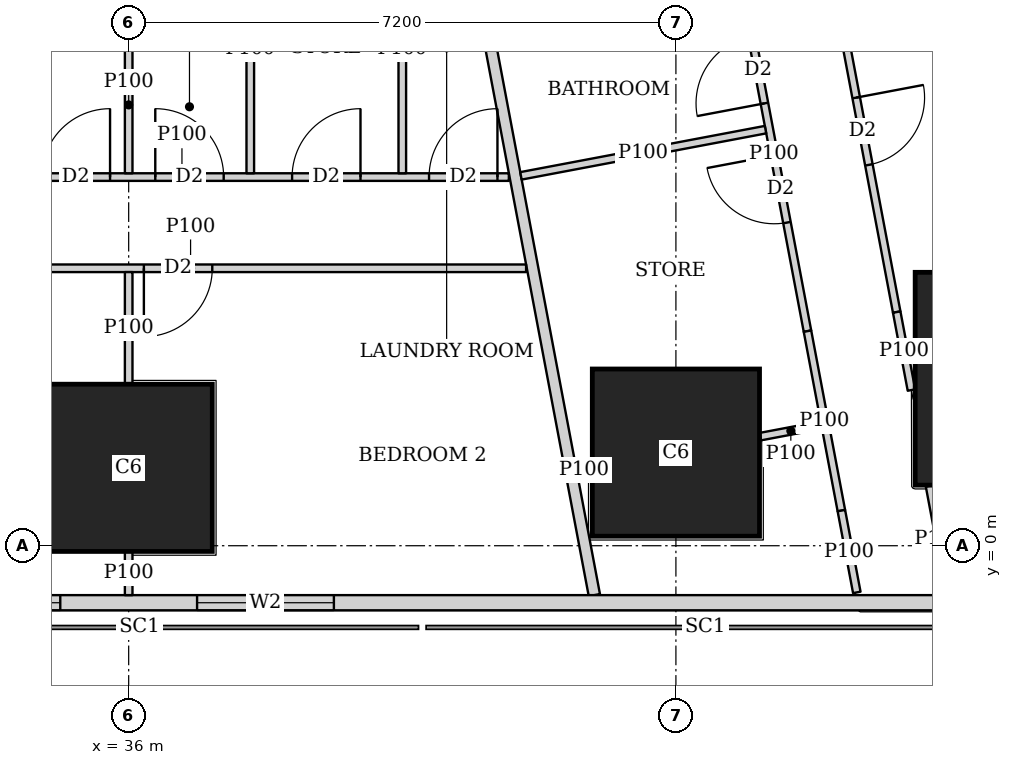
"""IFC4 building model, lengths in metres.
Left out: names, types, materials, properties, quantities, classifications, styles, units other than length and angle.
Written with IfcOpenShell. Run it as: python <this file> out.ifc"""

import sys

from ifc_helpers import new_model, si_unit, direction, frame, frame_2d, origin, origin_2d, place, context, subcontext, project, spatial, rectangle, extrude, element, fill, save


model = new_model("IFC4")
c1 = context("Model", 3, precision=1e-05, world=origin(), true_north=direction((0.0, 1.0)))
c2 = subcontext(c1, "Body", "Model", "MODEL_VIEW")
j1 = project(units=[si_unit("LENGTHUNIT", "METRE"), si_unit("PLANEANGLEUNIT", "RADIAN")], contexts=[c1])
p1 = place(None, origin())
s1 = spatial("IfcSite", under=j1, at=p1, CompositionType="ELEMENT")
p2 = place(p1, origin())
s2 = spatial("IfcBuilding", under=s1, at=p2, CompositionType="ELEMENT")
p3 = place(p2, frame((0.0, 0.0, 77.9)))
s3 = spatial("IfcBuildingStorey", under=s2, at=p3, CompositionType="ELEMENT", Elevation=77.9)
for number, where, z_axis, x_axis in (
    (1, (36.0, 1.025, 0.0), (0.0, 0.0, 1.0), (1.0, 0.0, 0.0)),
    (2, (43.2, 1.225, 0.0), (0.0, 0.0, 1.0), (1.0, 0.0, 0.0)),
):
    element("IfcColumn", number, at=place(p3, frame(where, z_axis=z_axis, x_axis=x_axis)), inside=s3, PredefinedType="COLUMN", context=c2, shape_type="SweptSolid", body=[
        extrude(rectangle(XDim=2.2, YDim=2.2, at=origin_2d()), origin(), (0.0, 0.0, 1.0), 3.75),
    ])
p4 = place(p3, frame((47.748, 2.197, 0.0), z_axis=(0.0, 0.0, 1.0), x_axis=(1.0, 0.0, 0.0)))
e3 = element("IfcColumn", 3, at=p4, inside=s3, PredefinedType="COLUMN", context=c2, shape_type="SweptSolid", body=[
    extrude(rectangle(XDim=2.8, YDim=2.8, at=origin_2d()), origin(), (0.0, 0.0, 1.0), 3.75),
])
p5 = place(p3, frame((2.163, -0.75, 0.0), z_axis=(0.0, 0.0, 1.0), x_axis=(1.0, 0.0, 0.0)))
e4 = element("IfcWall", 4, at=p5, inside=s3, PredefinedType="SOLIDWALL", context=c2, shape_type="SweptSolid", body=[
    extrude(rectangle(XDim=45.628, YDim=0.2, at=frame_2d((22.814, 0.0))), origin(), (0.0, 0.0, 1.0), 3.5),
])
p6 = place(p5, frame((9.537, 0.0, 0.9)))
e5 = element("IfcOpeningElement", 5, at=p6, cuts=e4, PredefinedType="OPENING", context=c2, shape_type="SweptSolid", body=[
    extrude(rectangle(XDim=1.8, YDim=1.5, at=frame_2d((0.9, 0.75))), frame((0.0, 0.11, 0.0), z_axis=(0.0, -1.0, 0.0), x_axis=(1.0, 0.0, 0.0)), (0.0, 0.0, 1.0), 0.22),
])
p7 = place(p5, frame((13.137, 0.0, 0.9)))
e6 = element("IfcOpeningElement", 6, at=p7, cuts=e4, PredefinedType="OPENING", context=c2, shape_type="SweptSolid", body=[
    extrude(rectangle(XDim=1.8, YDim=1.5, at=frame_2d((0.9, 0.75))), frame((0.0, 0.11, 0.0), z_axis=(0.0, -1.0, 0.0), x_axis=(1.0, 0.0, 0.0)), (0.0, 0.0, 1.0), 0.22),
])
p8 = place(p5, frame((16.737, 0.0, 0.9)))
e7 = element("IfcOpeningElement", 7, at=p8, cuts=e4, PredefinedType="OPENING", context=c2, shape_type="SweptSolid", body=[
    extrude(rectangle(XDim=1.8, YDim=1.5, at=frame_2d((0.9, 0.75))), frame((0.0, 0.11, 0.0), z_axis=(0.0, -1.0, 0.0), x_axis=(1.0, 0.0, 0.0)), (0.0, 0.0, 1.0), 0.22),
])
p9 = place(p5, frame((20.337, 0.0, 0.9)))
e8 = element("IfcOpeningElement", 8, at=p9, cuts=e4, PredefinedType="OPENING", context=c2, shape_type="SweptSolid", body=[
    extrude(rectangle(XDim=1.8, YDim=1.5, at=frame_2d((0.9, 0.75))), frame((0.0, 0.11, 0.0), z_axis=(0.0, -1.0, 0.0), x_axis=(1.0, 0.0, 0.0)), (0.0, 0.0, 1.0), 0.22),
])
p10 = place(p5, frame((23.937, 0.0, 0.9)))
e9 = element("IfcOpeningElement", 9, at=p10, cuts=e4, PredefinedType="OPENING", context=c2, shape_type="SweptSolid", body=[
    extrude(rectangle(XDim=1.8, YDim=1.5, at=frame_2d((0.9, 0.75))), frame((0.0, 0.11, 0.0), z_axis=(0.0, -1.0, 0.0), x_axis=(1.0, 0.0, 0.0)), (0.0, 0.0, 1.0), 0.22),
])
p11 = place(p5, frame((27.537, 0.0, 0.9)))
e10 = element("IfcOpeningElement", 10, at=p11, cuts=e4, PredefinedType="OPENING", context=c2, shape_type="SweptSolid", body=[
    extrude(rectangle(XDim=1.8, YDim=1.5, at=frame_2d((0.9, 0.75))), frame((0.0, 0.11, 0.0), z_axis=(0.0, -1.0, 0.0), x_axis=(1.0, 0.0, 0.0)), (0.0, 0.0, 1.0), 0.22),
])
p12 = place(p5, frame((31.137, 0.0, 0.9)))
e11 = element("IfcOpeningElement", 11, at=p12, cuts=e4, PredefinedType="OPENING", context=c2, shape_type="SweptSolid", body=[
    extrude(rectangle(XDim=1.8, YDim=1.5, at=frame_2d((0.9, 0.75))), frame((0.0, 0.11, 0.0), z_axis=(0.0, -1.0, 0.0), x_axis=(1.0, 0.0, 0.0)), (0.0, 0.0, 1.0), 0.22),
])
p13 = place(p5, frame((34.737, 0.0, 0.9)))
e12 = element("IfcOpeningElement", 12, at=p13, cuts=e4, PredefinedType="OPENING", context=c2, shape_type="SweptSolid", body=[
    extrude(rectangle(XDim=1.8, YDim=1.5, at=frame_2d((0.9, 0.75))), frame((0.0, 0.11, 0.0), z_axis=(0.0, -1.0, 0.0), x_axis=(1.0, 0.0, 0.0)), (0.0, 0.0, 1.0), 0.22),
])
p14 = place(p3, frame((50.653, 2.703, 0.0), z_axis=(0.0, 0.0, 1.0), x_axis=(-0.185612026696, 0.982623109613, 0.0)))
e13 = element("IfcWall", 13, at=p14, inside=s3, PredefinedType="SOLIDWALL", context=c2, shape_type="SweptSolid", body=[
    extrude(rectangle(XDim=41.393, YDim=0.2, at=frame_2d((20.697, 0.0))), origin(), (0.0, 0.0, 1.0), 3.5),
])
p15 = place(p14, frame((1.633, 0.0, 0.9)))
e14 = element("IfcOpeningElement", 14, at=p15, cuts=e13, PredefinedType="OPENING", context=c2, shape_type="SweptSolid", body=[
    extrude(rectangle(XDim=1.8, YDim=1.5, at=frame_2d((0.9, 0.75))), frame((0.0, 0.11, 0.0), z_axis=(0.0, -1.0, 0.0), x_axis=(1.0, 0.0, 0.0)), (0.0, 0.0, 1.0), 0.22),
])
p16 = place(p14, frame((6.032, 0.0, 0.9)))
e15 = element("IfcOpeningElement", 15, at=p16, cuts=e13, PredefinedType="OPENING", context=c2, shape_type="SweptSolid", body=[
    extrude(rectangle(XDim=1.8, YDim=1.5, at=frame_2d((0.9, 0.75))), frame((0.0, 0.11, 0.0), z_axis=(0.0, -1.0, 0.0), x_axis=(1.0, 0.0, 0.0)), (0.0, 0.0, 1.0), 0.22),
])
p17 = place(p14, frame((9.848, 0.0, 0.9)))
e16 = element("IfcOpeningElement", 16, at=p17, cuts=e13, PredefinedType="OPENING", context=c2, shape_type="SweptSolid", body=[
    extrude(rectangle(XDim=1.8, YDim=1.5, at=frame_2d((0.9, 0.75))), frame((0.0, 0.11, 0.0), z_axis=(0.0, -1.0, 0.0), x_axis=(1.0, 0.0, 0.0)), (0.0, 0.0, 1.0), 0.22),
])
p18 = place(p14, frame((13.664, 0.0, 0.9)))
e17 = element("IfcOpeningElement", 17, at=p18, cuts=e13, PredefinedType="OPENING", context=c2, shape_type="SweptSolid", body=[
    extrude(rectangle(XDim=1.8, YDim=1.5, at=frame_2d((0.9, 0.75))), frame((0.0, 0.11, 0.0), z_axis=(0.0, -1.0, 0.0), x_axis=(1.0, 0.0, 0.0)), (0.0, 0.0, 1.0), 0.22),
])
p19 = place(p14, frame((17.481, 0.0, 0.9)))
e18 = element("IfcOpeningElement", 18, at=p19, cuts=e13, PredefinedType="OPENING", context=c2, shape_type="SweptSolid", body=[
    extrude(rectangle(XDim=1.8, YDim=1.5, at=frame_2d((0.9, 0.75))), frame((0.0, 0.11, 0.0), z_axis=(0.0, -1.0, 0.0), x_axis=(1.0, 0.0, 0.0)), (0.0, 0.0, 1.0), 0.22),
])
p20 = place(p14, frame((21.297, 0.0, 0.9)))
e19 = element("IfcOpeningElement", 19, at=p20, cuts=e13, PredefinedType="OPENING", context=c2, shape_type="SweptSolid", body=[
    extrude(rectangle(XDim=1.8, YDim=1.5, at=frame_2d((0.9, 0.75))), frame((0.0, 0.11, 0.0), z_axis=(0.0, -1.0, 0.0), x_axis=(1.0, 0.0, 0.0)), (0.0, 0.0, 1.0), 0.22),
])
p21 = place(p14, frame((25.113, 0.0, 0.9)))
e20 = element("IfcOpeningElement", 20, at=p21, cuts=e13, PredefinedType="OPENING", context=c2, shape_type="SweptSolid", body=[
    extrude(rectangle(XDim=1.8, YDim=1.5, at=frame_2d((0.9, 0.75))), frame((0.0, 0.11, 0.0), z_axis=(0.0, -1.0, 0.0), x_axis=(1.0, 0.0, 0.0)), (0.0, 0.0, 1.0), 0.22),
])
p22 = place(p14, frame((28.93, 0.0, 0.9)))
e21 = element("IfcOpeningElement", 21, at=p22, cuts=e13, PredefinedType="OPENING", context=c2, shape_type="SweptSolid", body=[
    extrude(rectangle(XDim=1.8, YDim=1.5, at=frame_2d((0.9, 0.75))), frame((0.0, 0.11, 0.0), z_axis=(0.0, -1.0, 0.0), x_axis=(1.0, 0.0, 0.0)), (0.0, 0.0, 1.0), 0.22),
])
p23 = place(p14, frame((32.746, 0.0, 0.9)))
e22 = element("IfcOpeningElement", 22, at=p23, cuts=e13, PredefinedType="OPENING", context=c2, shape_type="SweptSolid", body=[
    extrude(rectangle(XDim=1.8, YDim=1.5, at=frame_2d((0.9, 0.75))), frame((0.0, 0.11, 0.0), z_axis=(0.0, -1.0, 0.0), x_axis=(1.0, 0.0, 0.0)), (0.0, 0.0, 1.0), 0.22),
])
p24 = place(p14, frame((36.481, 0.0, 0.9)))
e23 = element("IfcOpeningElement", 23, at=p24, cuts=e13, PredefinedType="OPENING", context=c2, shape_type="SweptSolid", body=[
    extrude(rectangle(XDim=1.8, YDim=1.5, at=frame_2d((0.9, 0.75))), frame((0.0, 0.11, 0.0), z_axis=(0.0, -1.0, 0.0), x_axis=(1.0, 0.0, 0.0)), (0.0, 0.0, 1.0), 0.22),
])
p25 = place(p3, frame((33.382, 45.65, 0.0), z_axis=(0.0, 0.0, 1.0), x_axis=(0.185593544777, -0.982626600565, 0.0)))
e24 = element("IfcWall", 24, at=p25, inside=s3, PredefinedType="SOLIDWALL", context=c2, shape_type="SweptSolid", body=[
    extrude(rectangle(XDim=47.118, YDim=0.15, at=frame_2d((23.559, 0.0))), origin(), (0.0, 0.0, 1.0), 2.2),
])
p26 = place(p25, frame((19.054, 0.0, 0.0)))
e25 = element("IfcOpeningElement", 25, at=p26, cuts=e24, PredefinedType="OPENING", context=c2, shape_type="SweptSolid", body=[
    extrude(rectangle(XDim=1.0, YDim=2.1, at=frame_2d((0.5, 1.05))), frame((0.0, 0.085, 0.0), z_axis=(0.0, -1.0, 0.0), x_axis=(1.0, 0.0, 0.0)), (0.0, 0.0, 1.0), 0.17),
])
p27 = place(p25, frame((22.87, 0.0, 0.0)))
e26 = element("IfcOpeningElement", 26, at=p27, cuts=e24, PredefinedType="OPENING", context=c2, shape_type="SweptSolid", body=[
    extrude(rectangle(XDim=1.0, YDim=2.1, at=frame_2d((0.5, 1.05))), frame((0.0, 0.085, 0.0), z_axis=(0.0, -1.0, 0.0), x_axis=(1.0, 0.0, 0.0)), (0.0, 0.0, 1.0), 0.17),
])
p28 = place(p25, frame((33.833, 0.0, 0.0)))
e27 = element("IfcOpeningElement", 27, at=p28, cuts=e24, PredefinedType="OPENING", context=c2, shape_type="SweptSolid", body=[
    extrude(rectangle(XDim=1.0, YDim=2.1, at=frame_2d((0.5, 1.05))), frame((0.0, 0.085, 0.0), z_axis=(0.0, -1.0, 0.0), x_axis=(1.0, 0.0, 0.0)), (0.0, 0.0, 1.0), 0.17),
])
p29 = place(p3, frame((41.229, 3.65, 0.0), z_axis=(0.0, 0.0, 1.0), x_axis=(-1.0, 0.0, 0.0)))
e28 = element("IfcWall", 28, at=p29, inside=s3, PredefinedType="PARTITIONING", context=c2, shape_type="SweptSolid", body=[
    extrude(rectangle(XDim=8.829, YDim=0.1, at=frame_2d((4.415, 0.0))), origin(), (0.0, 0.0, 1.0), 3.5),
])
p30 = place(p29, frame((7.729, 0.0, 0.0)))
e29 = element("IfcOpeningElement", 29, at=p30, cuts=e28, PredefinedType="OPENING", context=c2, shape_type="SweptSolid", body=[
    extrude(rectangle(XDim=0.9, YDim=2.1, at=frame_2d((0.45, 1.05))), frame((0.0, 0.06, 0.0), z_axis=(0.0, -1.0, 0.0), x_axis=(1.0, 0.0, 0.0)), (0.0, 0.0, 1.0), 0.12),
])
p31 = place(p29, frame((4.129, 0.0, 0.0)))
e30 = element("IfcOpeningElement", 30, at=p31, cuts=e28, PredefinedType="OPENING", context=c2, shape_type="SweptSolid", body=[
    extrude(rectangle(XDim=0.9, YDim=2.1, at=frame_2d((0.45, 1.05))), frame((0.0, 0.06, 0.0), z_axis=(0.0, -1.0, 0.0), x_axis=(1.0, 0.0, 0.0)), (0.0, 0.0, 1.0), 0.12),
])
p32 = place(p3, frame((41.002, 4.85, 0.0), z_axis=(0.0, 0.0, 1.0), x_axis=(-1.0, 0.0, 0.0)))
e31 = element("IfcWall", 31, at=p32, inside=s3, PredefinedType="PARTITIONING", context=c2, shape_type="SweptSolid", body=[
    extrude(rectangle(XDim=8.602, YDim=0.1, at=frame_2d((4.301, 0.0))), origin(), (0.0, 0.0, 1.0), 3.5),
])
p33 = place(p32, frame((7.047, 0.0, 0.0)))
e32 = element("IfcOpeningElement", 32, at=p33, cuts=e31, PredefinedType="OPENING", context=c2, shape_type="SweptSolid", body=[
    extrude(rectangle(XDim=0.9, YDim=2.1, at=frame_2d((0.45, 1.05))), frame((0.0, 0.06, 0.0), z_axis=(0.0, -1.0, 0.0), x_axis=(1.0, 0.0, 0.0)), (0.0, 0.0, 1.0), 0.12),
])
p34 = place(p32, frame((3.752, 0.0, 0.0)))
e33 = element("IfcOpeningElement", 33, at=p34, cuts=e31, PredefinedType="OPENING", context=c2, shape_type="SweptSolid", body=[
    extrude(rectangle(XDim=0.9, YDim=2.1, at=frame_2d((0.45, 1.05))), frame((0.0, 0.06, 0.0), z_axis=(0.0, -1.0, 0.0), x_axis=(1.0, 0.0, 0.0)), (0.0, 0.0, 1.0), 0.12),
])
p35 = place(p32, frame((0.15, 0.0, 0.0)))
e34 = element("IfcOpeningElement", 34, at=p35, cuts=e31, PredefinedType="OPENING", context=c2, shape_type="SweptSolid", body=[
    extrude(rectangle(XDim=0.9, YDim=2.1, at=frame_2d((0.45, 1.05))), frame((0.0, 0.06, 0.0), z_axis=(0.0, -1.0, 0.0), x_axis=(1.0, 0.0, 0.0)), (0.0, 0.0, 1.0), 0.12),
])
p36 = place(p32, frame((5.247, 0.0, 0.0)))
e35 = element("IfcOpeningElement", 35, at=p36, cuts=e31, PredefinedType="OPENING", context=c2, shape_type="SweptSolid", body=[
    extrude(rectangle(XDim=0.9, YDim=2.1, at=frame_2d((0.45, 1.05))), frame((0.0, 0.06, 0.0), z_axis=(0.0, -1.0, 0.0), x_axis=(1.0, 0.0, 0.0)), (0.0, 0.0, 1.0), 0.12),
])
p37 = place(p32, frame((1.952, 0.0, 0.0)))
e36 = element("IfcOpeningElement", 36, at=p37, cuts=e31, PredefinedType="OPENING", context=c2, shape_type="SweptSolid", body=[
    extrude(rectangle(XDim=0.9, YDim=2.1, at=frame_2d((0.45, 1.05))), frame((0.0, 0.06, 0.0), z_axis=(0.0, -1.0, 0.0), x_axis=(1.0, 0.0, 0.0)), (0.0, 0.0, 1.0), 0.12),
])
p38 = place(p3, frame((36.0, -0.65, 0.0), z_axis=(0.0, 0.0, 1.0), x_axis=(0.0, 1.0, 0.0)))
e37 = element("IfcWall", 37, at=p38, inside=s3, PredefinedType="PARTITIONING", context=c2, shape_type="SweptSolid", body=[
    extrude(rectangle(XDim=0.574, YDim=0.1, at=frame_2d((0.287, 0.0))), origin(), (0.0, 0.0, 1.0), 3.5),
])
p39 = place(p3, frame((36.0, 2.126, 0.0), z_axis=(0.0, 0.0, 1.0), x_axis=(0.0, 1.0, 0.0)))
e38 = element("IfcWall", 38, at=p39, inside=s3, PredefinedType="PARTITIONING", context=c2, shape_type="SweptSolid", body=[
    extrude(rectangle(XDim=1.474, YDim=0.1, at=frame_2d((0.737, 0.0))), origin(), (0.0, 0.0, 1.0), 3.5),
])
p40 = place(p3, frame((36.0, 4.9, 0.0), z_axis=(0.0, 0.0, 1.0), x_axis=(0.0, 1.0, 0.0)))
e39 = element("IfcWall", 39, at=p40, inside=s3, PredefinedType="PARTITIONING", context=c2, shape_type="SweptSolid", body=[
    extrude(rectangle(XDim=1.799, YDim=0.1, at=frame_2d((0.899, 0.0))), origin(), (0.0, 0.0, 1.0), 3.5),
])
for number, where, z_axis, x_axis in (
    (40, (39.6, 4.9, 0.0), (0.0, 0.0, 1.0), (0.0, 1.0, 0.0)),
    (41, (37.6, 4.9, 0.0), (0.0, 0.0, 1.0), (0.0, 1.0, 0.0)),
):
    element("IfcWall", number, at=place(p3, frame(where, z_axis=z_axis, x_axis=x_axis)), inside=s3, PredefinedType="PARTITIONING", context=c2, shape_type="SweptSolid", body=[
        extrude(rectangle(XDim=3.275, YDim=0.1, at=frame_2d((1.638, 0.0))), origin(), (0.0, 0.0, 1.0), 3.5),
    ])
p41 = place(p3, frame((44.727, 10.366, 0.0), z_axis=(0.0, 0.0, 1.0), x_axis=(0.185678775129, -0.982610498858, 0.0)))
e42 = element("IfcWall", 42, at=p41, inside=s3, PredefinedType="PARTITIONING", context=c2, shape_type="SweptSolid", body=[
    extrude(rectangle(XDim=7.421, YDim=0.1, at=frame_2d((3.71, 0.0))), origin(), (0.0, 0.0, 1.0), 3.5),
])
p42 = place(p41, frame((0.151, 0.0, 0.0)))
e43 = element("IfcOpeningElement", 43, at=p42, cuts=e42, PredefinedType="OPENING", context=c2, shape_type="SweptSolid", body=[
    extrude(rectangle(XDim=0.9, YDim=2.1, at=frame_2d((0.45, 1.05))), frame((0.0, 0.06, 0.0), z_axis=(0.0, -1.0, 0.0), x_axis=(1.0, 0.0, 0.0)), (0.0, 0.0, 1.0), 0.12),
])
p43 = place(p41, frame((4.55, 0.0, 0.0)))
e44 = element("IfcOpeningElement", 44, at=p43, cuts=e42, PredefinedType="OPENING", context=c2, shape_type="SweptSolid", body=[
    extrude(rectangle(XDim=0.9, YDim=2.1, at=frame_2d((0.45, 1.05))), frame((0.0, 0.06, 0.0), z_axis=(0.0, -1.0, 0.0), x_axis=(1.0, 0.0, 0.0)), (0.0, 0.0, 1.0), 0.12),
])
p44 = place(p3, frame((46.105, 3.074, 0.0), z_axis=(0.0, 0.0, 1.0), x_axis=(0.185897769544, -0.982569091351, 0.0)))
e45 = element("IfcWall", 45, at=p44, inside=s3, PredefinedType="PARTITIONING", context=c2, shape_type="SweptSolid", body=[
    extrude(rectangle(XDim=1.044, YDim=0.1, at=frame_2d((0.522, 0.0))), origin(), (0.0, 0.0, 1.0), 2.05),
])
p45 = place(p3, frame((46.537, 0.787, 0.0), z_axis=(0.0, 0.0, 1.0), x_axis=(0.185348284603, -0.982672892368, 0.0)))
e46 = element("IfcWall", 46, at=p45, inside=s3, PredefinedType="PARTITIONING", context=c2, shape_type="SweptSolid", body=[
    extrude(rectangle(XDim=1.419, YDim=0.1, at=frame_2d((0.709, 0.0))), origin(), (0.0, 0.0, 1.0), 2.05),
])
p46 = place(p3, frame((44.049, 7.49, 0.0), z_axis=(0.0, 0.0, 1.0), x_axis=(0.185666332607, -0.982612849975, 0.0)))
e47 = element("IfcWall", 47, at=p46, inside=s3, PredefinedType="PARTITIONING", context=c2, shape_type="SweptSolid", body=[
    extrude(rectangle(XDim=4.75, YDim=0.1, at=frame_2d((2.375, 0.0))), origin(), (0.0, 0.0, 1.0), 3.5),
])
p47 = place(p46, frame((0.8, 0.0, 0.0)))
e48 = element("IfcOpeningElement", 48, at=p47, cuts=e47, PredefinedType="OPENING", context=c2, shape_type="SweptSolid", body=[
    extrude(rectangle(XDim=0.9, YDim=2.1, at=frame_2d((0.45, 1.05))), frame((0.0, 0.06, 0.0), z_axis=(0.0, -1.0, 0.0), x_axis=(1.0, 0.0, 0.0)), (0.0, 0.0, 1.0), 0.12),
])
p48 = place(p46, frame((2.396, 0.0, 0.0)))
e49 = element("IfcOpeningElement", 49, at=p48, cuts=e47, PredefinedType="OPENING", context=c2, shape_type="SweptSolid", body=[
    extrude(rectangle(XDim=0.9, YDim=2.1, at=frame_2d((0.45, 1.05))), frame((0.0, 0.06, 0.0), z_axis=(0.0, -1.0, 0.0), x_axis=(1.0, 0.0, 0.0)), (0.0, 0.0, 1.0), 0.12),
])
p49 = place(p3, frame((44.931, 2.823, 0.0), z_axis=(0.0, 0.0, 1.0), x_axis=(0.185631845838, -0.982619365681, 0.0)))
e50 = element("IfcWall", 50, at=p49, inside=s3, PredefinedType="PARTITIONING", context=c2, shape_type="SweptSolid", body=[
    extrude(rectangle(XDim=2.403, YDim=0.1, at=frame_2d((1.201, 0.0))), origin(), (0.0, 0.0, 1.0), 2.05),
])
p50 = place(p3, frame((45.377, 0.462, 0.0), z_axis=(0.0, 0.0, 1.0), x_axis=(0.185513480919, -0.982641719243, 0.0)))
e51 = element("IfcWall", 51, at=p50, inside=s3, PredefinedType="PARTITIONING", context=c2, shape_type="SweptSolid", body=[
    extrude(rectangle(XDim=1.095, YDim=0.1, at=frame_2d((0.547, 0.0))), origin(), (0.0, 0.0, 1.0), 3.5),
])
p51 = place(p3, frame((45.114, 1.587, 0.0), z_axis=(0.0, 0.0, 1.0), x_axis=(-0.982624706348, -0.185603573443, 0.0)))
e52 = element("IfcWall", 52, at=p51, inside=s3, PredefinedType="PARTITIONING", context=c2, shape_type="SweptSolid", body=[
    extrude(rectangle(XDim=0.818, YDim=0.1, at=frame_2d((0.409, 0.0))), origin(), (0.0, 0.0, 1.0), 2.05),
])
p52 = place(p3, frame((42.09, 1.016, 0.0), z_axis=(0.0, 0.0, 1.0), x_axis=(-0.982208563973, -0.187793335502, 0.0)))
e53 = element("IfcWall", 53, at=p52, inside=s3, PredefinedType="PARTITIONING", context=c2, shape_type="SweptSolid", body=[
    extrude(rectangle(XDim=0.198, YDim=0.1, at=frame_2d((0.099, 0.0))), origin(), (0.0, 0.0, 1.0), 2.05),
])
p53 = place(p3, frame((44.379, 5.474, 0.0), z_axis=(0.0, 0.0, 1.0), x_axis=(-0.982607026909, -0.185697147715, 0.0)))
e54 = element("IfcWall", 54, at=p53, inside=s3, PredefinedType="PARTITIONING", context=c2, shape_type="SweptSolid", body=[
    extrude(rectangle(XDim=3.275, YDim=0.1, at=frame_2d((1.637, 0.0))), origin(), (0.0, 0.0, 1.0), 3.5),
])
p54 = place(p12, origin())
e55 = element("IfcWindow", 55, at=p54, inside=s3, PartitioningType="SINGLE_PANEL", PredefinedType="WINDOW", context=c2, shape_type="SweptSolid", body=[
    extrude(rectangle(XDim=1.8, YDim=1.5, at=frame_2d((0.9, 0.75))), frame((0.0, 0.03, 0.0), z_axis=(0.0, -1.0, 0.0), x_axis=(1.0, 0.0, 0.0)), (0.0, 0.0, 1.0), 0.06),
])
fill(e11, e55)
p55 = place(p13, origin())
e56 = element("IfcWindow", 56, at=p55, inside=s3, PartitioningType="SINGLE_PANEL", PredefinedType="WINDOW", context=c2, shape_type="SweptSolid", body=[
    extrude(rectangle(XDim=1.8, YDim=1.5, at=frame_2d((0.9, 0.75))), frame((0.0, 0.03, 0.0), z_axis=(0.0, -1.0, 0.0), x_axis=(1.0, 0.0, 0.0)), (0.0, 0.0, 1.0), 0.06),
])
fill(e12, e56)
p56 = place(p31, origin())
e57 = element("IfcDoor", 57, at=p56, inside=s3, OperationType="SINGLE_SWING_RIGHT", PredefinedType="DOOR", context=c2, shape_type="SweptSolid", body=[
    extrude(rectangle(XDim=0.9, YDim=2.1, at=frame_2d((0.45, 1.05))), frame((0.0, 0.025, 0.0), z_axis=(0.0, -1.0, 0.0), x_axis=(1.0, 0.0, 0.0)), (0.0, 0.0, 1.0), 0.05),
])
fill(e30, e57)
p57 = place(p34, origin())
e58 = element("IfcDoor", 58, at=p57, inside=s3, OperationType="SINGLE_SWING_LEFT", PredefinedType="DOOR", context=c2, shape_type="SweptSolid", body=[
    extrude(rectangle(XDim=0.9, YDim=2.1, at=frame_2d((0.45, 1.05))), frame((0.0, 0.025, 0.0), z_axis=(0.0, -1.0, 0.0), x_axis=(1.0, 0.0, 0.0)), (0.0, 0.0, 1.0), 0.05),
])
fill(e33, e58)
p58 = place(p35, origin())
e59 = element("IfcDoor", 59, at=p58, inside=s3, OperationType="SINGLE_SWING_RIGHT", PredefinedType="DOOR", context=c2, shape_type="SweptSolid", body=[
    extrude(rectangle(XDim=0.9, YDim=2.1, at=frame_2d((0.45, 1.05))), frame((0.0, 0.025, 0.0), z_axis=(0.0, -1.0, 0.0), x_axis=(1.0, 0.0, 0.0)), (0.0, 0.0, 1.0), 0.05),
])
fill(e34, e59)
p59 = place(p36, origin())
e60 = element("IfcDoor", 60, at=p59, inside=s3, OperationType="SINGLE_SWING_RIGHT", PredefinedType="DOOR", context=c2, shape_type="SweptSolid", body=[
    extrude(rectangle(XDim=0.9, YDim=2.1, at=frame_2d((0.45, 1.05))), frame((0.0, 0.025, 0.0), z_axis=(0.0, -1.0, 0.0), x_axis=(1.0, 0.0, 0.0)), (0.0, 0.0, 1.0), 0.05),
])
fill(e35, e60)
p60 = place(p37, origin())
e61 = element("IfcDoor", 61, at=p60, inside=s3, OperationType="SINGLE_SWING_RIGHT", PredefinedType="DOOR", context=c2, shape_type="SweptSolid", body=[
    extrude(rectangle(XDim=0.9, YDim=2.1, at=frame_2d((0.45, 1.05))), frame((0.0, 0.025, 0.0), z_axis=(0.0, -1.0, 0.0), x_axis=(1.0, 0.0, 0.0)), (0.0, 0.0, 1.0), 0.05),
])
fill(e36, e61)
p61 = place(p43, origin())
e62 = element("IfcDoor", 62, at=p61, inside=s3, OperationType="SINGLE_SWING_LEFT", PredefinedType="DOOR", context=c2, shape_type="SweptSolid", body=[
    extrude(rectangle(XDim=0.9, YDim=2.1, at=frame_2d((0.45, 1.05))), frame((0.0, 0.025, 0.0), z_axis=(0.0, -1.0, 0.0), x_axis=(1.0, 0.0, 0.0)), (0.0, 0.0, 1.0), 0.05),
])
fill(e44, e62)
p62 = place(p47, origin())
e63 = element("IfcDoor", 63, at=p62, inside=s3, OperationType="SINGLE_SWING_LEFT", PredefinedType="DOOR", context=c2, shape_type="SweptSolid", body=[
    extrude(rectangle(XDim=0.9, YDim=2.1, at=frame_2d((0.45, 1.05))), frame((0.0, 0.025, 0.0), z_axis=(0.0, -1.0, 0.0), x_axis=(1.0, 0.0, 0.0)), (0.0, 0.0, 1.0), 0.05),
])
fill(e48, e63)
p63 = place(p48, origin())
e64 = element("IfcDoor", 64, at=p63, inside=s3, OperationType="SINGLE_SWING_RIGHT", PredefinedType="DOOR", context=c2, shape_type="SweptSolid", body=[
    extrude(rectangle(XDim=0.9, YDim=2.1, at=frame_2d((0.45, 1.05))), frame((0.0, 0.025, 0.0), z_axis=(0.0, -1.0, 0.0), x_axis=(1.0, 0.0, 0.0)), (0.0, 0.0, 1.0), 0.05),
])
fill(e49, e64)
save(model, sys.argv[1])
